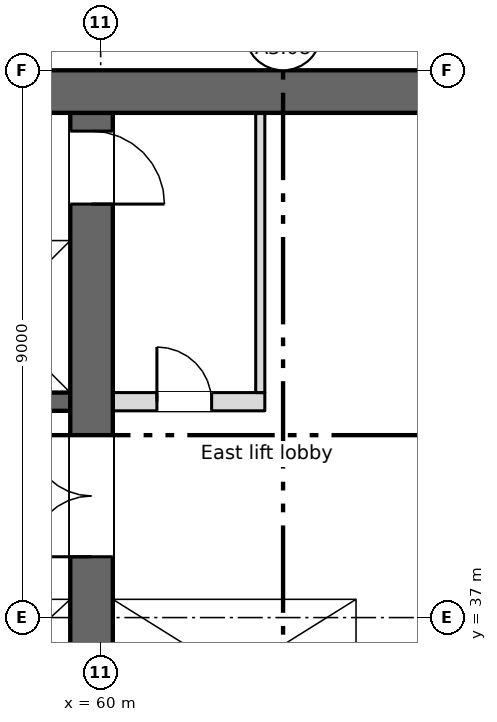
"""IFC4 building model, lengths in metres.
Left out: names, types, materials, properties, quantities, classifications, styles, units other than length and angle.
Written with IfcOpenShell. Run it as: python <this file> out.ifc"""

import sys

from ifc_helpers import new_model, si_unit, direction, frame, frame_2d, origin, place, context, subcontext, project, spatial, rectangle, extrude, element, fill, save


model = new_model("IFC4")
c1 = context("Model", 3, precision=1e-05, world=origin(), true_north=direction((0.0, 1.0)))
c2 = subcontext(c1, "Body", "Model", "MODEL_VIEW")
j1 = project(units=[si_unit("LENGTHUNIT", "METRE"), si_unit("PLANEANGLEUNIT", "RADIAN")], contexts=[c1])
p1 = place(None, origin())
s1 = spatial("IfcSite", under=j1, at=p1, CompositionType="ELEMENT")
p2 = place(p1, origin())
s2 = spatial("IfcBuilding", under=s1, at=p2, CompositionType="ELEMENT")
p3 = place(p2, frame((0.0, 0.0, 215.5)))
s3 = spatial("IfcBuildingStorey", under=s2, at=p3, CompositionType="ELEMENT", Elevation=215.5)
p4 = place(p3, frame((11.55, 45.65, 0.0), z_axis=(0.0, 0.0, 1.0), x_axis=(1.0, 0.0, 0.0)))
e1 = element("IfcWall", 1, at=p4, inside=s3, PredefinedType="SHEAR", context=c2, shape_type="SweptSolid", body=[
    extrude(rectangle(XDim=54.9, YDim=0.7, at=frame_2d((27.45, 0.0))), origin(), (0.0, 0.0, 1.0), 3.35),
])
p5 = place(p4, frame((1.2, 0.0, 0.6)))
e2 = element("IfcOpeningElement", 2, at=p5, cuts=e1, PredefinedType="OPENING", context=c2, shape_type="SweptSolid", body=[
    extrude(rectangle(XDim=0.6, YDim=2.4, at=frame_2d((0.3, 1.2))), frame((0.0, 0.36, 0.0), z_axis=(0.0, -1.0, 0.0), x_axis=(1.0, 0.0, 0.0)), (0.0, 0.0, 1.0), 0.72),
])
p6 = place(p3, frame((64.35, 34.8, 0.0), z_axis=(0.0, 0.0, 1.0), x_axis=(0.0, 1.0, 0.0)))
e3 = element("IfcWall", 3, at=p6, inside=s3, PredefinedType="SHEAR", context=c2, shape_type="SweptSolid", body=[
    extrude(rectangle(XDim=10.5, YDim=0.3, at=frame_2d((5.25, 0.0))), origin(), (0.0, 0.0, 1.0), 3.35),
])
p7 = place(p3, frame((59.85, 28.4, 0.0), z_axis=(0.0, 0.0, 1.0), x_axis=(0.0, 1.0, 0.0)))
e4 = element("IfcWall", 4, at=p7, inside=s3, PredefinedType="SHEAR", context=c2, shape_type="SweptSolid", body=[
    extrude(rectangle(XDim=16.9, YDim=0.7, at=frame_2d((8.45, 0.0))), origin(), (0.0, 0.0, 1.0), 3.35),
])
p8 = place(p7, frame((9.6, 0.0, 0.0)))
e5 = element("IfcOpeningElement", 5, at=p8, cuts=e4, PredefinedType="OPENING", context=c2, shape_type="SweptSolid", body=[
    extrude(rectangle(XDim=2.0, YDim=2.1, at=frame_2d((1.0, 1.05))), frame((0.0, 0.36, 0.0), z_axis=(0.0, -1.0, 0.0), x_axis=(1.0, 0.0, 0.0)), (0.0, 0.0, 1.0), 0.72),
])
p9 = place(p7, frame((15.4, 0.0, 0.0)))
e6 = element("IfcOpeningElement", 6, at=p9, cuts=e4, PredefinedType="OPENING", context=c2, shape_type="SweptSolid", body=[
    extrude(rectangle(XDim=1.2, YDim=2.1, at=frame_2d((0.6, 1.05))), frame((0.0, 0.36, 0.0), z_axis=(0.0, -1.0, 0.0), x_axis=(1.0, 0.0, 0.0)), (0.0, 0.0, 1.0), 0.72),
])
p10 = place(p3, frame((47.3, 37.45, 0.0), z_axis=(0.0, 0.0, 1.0), x_axis=(1.0, 0.0, 0.0)))
e7 = element("IfcWall", 7, at=p10, inside=s3, PredefinedType="SHEAR", context=c2, shape_type="SweptSolid", body=[
    extrude(rectangle(XDim=12.2, YDim=0.3, at=frame_2d((6.1, 0.0))), origin(), (0.0, 0.0, 1.0), 3.35),
])
p11 = place(p10, frame((4.3, 0.0, 0.0)))
e8 = element("IfcOpeningElement", 8, at=p11, cuts=e7, PredefinedType="OPENING", context=c2, shape_type="SweptSolid", body=[
    extrude(rectangle(XDim=1.1, YDim=2.1, at=frame_2d((0.55, 1.05))), frame((0.0, 0.16, 0.0), z_axis=(0.0, -1.0, 0.0), x_axis=(1.0, 0.0, 0.0)), (0.0, 0.0, 1.0), 0.32),
])
p12 = place(p10, frame((7.3, 0.0, 0.0)))
e9 = element("IfcOpeningElement", 9, at=p12, cuts=e7, PredefinedType="OPENING", context=c2, shape_type="SweptSolid", body=[
    extrude(rectangle(XDim=1.1, YDim=2.1, at=frame_2d((0.55, 1.05))), frame((0.0, 0.16, 0.0), z_axis=(0.0, -1.0, 0.0), x_axis=(1.0, 0.0, 0.0)), (0.0, 0.0, 1.0), 0.32),
])
p13 = place(p10, frame((10.3, 0.0, 0.0)))
e10 = element("IfcOpeningElement", 10, at=p13, cuts=e7, PredefinedType="OPENING", context=c2, shape_type="SweptSolid", body=[
    extrude(rectangle(XDim=1.1, YDim=2.1, at=frame_2d((0.55, 1.05))), frame((0.0, 0.16, 0.0), z_axis=(0.0, -1.0, 0.0), x_axis=(1.0, 0.0, 0.0)), (0.0, 0.0, 1.0), 0.32),
])
p14 = place(p3, frame((60.2, 37.45, 0.0), z_axis=(0.0, 0.0, 1.0), x_axis=(1.0, 0.0, 0.0)))
e11 = element("IfcWall", 11, at=p14, inside=s3, PredefinedType="SHEAR", context=c2, shape_type="SweptSolid", body=[
    extrude(rectangle(XDim=4.0, YDim=0.3, at=frame_2d((2.0, 0.0))), origin(), (0.0, 0.0, 1.0), 3.35),
])
p15 = place(p14, frame((1.45, 0.0, 0.0)))
e12 = element("IfcOpeningElement", 12, at=p15, cuts=e11, PredefinedType="OPENING", context=c2, shape_type="SweptSolid", body=[
    extrude(rectangle(XDim=1.1, YDim=2.1, at=frame_2d((0.55, 1.05))), frame((0.0, 0.16, 0.0), z_axis=(0.0, -1.0, 0.0), x_axis=(1.0, 0.0, 0.0)), (0.0, 0.0, 1.0), 0.32),
])
p16 = place(p3, frame((18.5, 40.55, 0.0), z_axis=(0.0, 0.0, 1.0), x_axis=(1.0, 0.0, 0.0)))
e13 = element("IfcWall", 13, at=p16, inside=s3, PredefinedType="SHEAR", context=c2, shape_type="SweptSolid", body=[
    extrude(rectangle(XDim=41.0, YDim=0.3, at=frame_2d((20.5, 0.0))), origin(), (0.0, 0.0, 1.0), 3.35),
])
p17 = place(p16, frame((2.15, 0.0, 0.0)))
e14 = element("IfcOpeningElement", 14, at=p17, cuts=e13, PredefinedType="OPENING", context=c2, shape_type="SweptSolid", body=[
    extrude(rectangle(XDim=0.9, YDim=2.1, at=frame_2d((0.45, 1.05))), frame((0.0, 0.16, 0.0), z_axis=(0.0, -1.0, 0.0), x_axis=(1.0, 0.0, 0.0)), (0.0, 0.0, 1.0), 0.32),
])
p18 = place(p16, frame((15.9, 0.0, 0.0)))
e15 = element("IfcOpeningElement", 15, at=p18, cuts=e13, PredefinedType="OPENING", context=c2, shape_type="SweptSolid", body=[
    extrude(rectangle(XDim=0.9, YDim=2.1, at=frame_2d((0.45, 1.05))), frame((0.0, 0.16, 0.0), z_axis=(0.0, -1.0, 0.0), x_axis=(1.0, 0.0, 0.0)), (0.0, 0.0, 1.0), 0.32),
])
p19 = place(p16, frame((21.4, 0.0, 0.0)))
e16 = element("IfcOpeningElement", 16, at=p19, cuts=e13, PredefinedType="OPENING", context=c2, shape_type="SweptSolid", body=[
    extrude(rectangle(XDim=0.9, YDim=2.1, at=frame_2d((0.45, 1.05))), frame((0.0, 0.16, 0.0), z_axis=(0.0, -1.0, 0.0), x_axis=(1.0, 0.0, 0.0)), (0.0, 0.0, 1.0), 0.32),
])
p20 = place(p16, frame((26.9, 0.0, 0.0)))
e17 = element("IfcOpeningElement", 17, at=p20, cuts=e13, PredefinedType="OPENING", context=c2, shape_type="SweptSolid", body=[
    extrude(rectangle(XDim=0.9, YDim=2.1, at=frame_2d((0.45, 1.05))), frame((0.0, 0.16, 0.0), z_axis=(0.0, -1.0, 0.0), x_axis=(1.0, 0.0, 0.0)), (0.0, 0.0, 1.0), 0.32),
])
p21 = place(p16, frame((6.175, 0.0, 0.0)))
e18 = element("IfcOpeningElement", 18, at=p21, cuts=e13, PredefinedType="OPENING", context=c2, shape_type="SweptSolid", body=[
    extrude(rectangle(XDim=1.1, YDim=2.1, at=frame_2d((0.55, 1.05))), frame((0.0, 0.16, 0.0), z_axis=(0.0, -1.0, 0.0), x_axis=(1.0, 0.0, 0.0)), (0.0, 0.0, 1.0), 0.32),
])
p22 = place(p16, frame((8.925, 0.0, 0.0)))
e19 = element("IfcOpeningElement", 19, at=p22, cuts=e13, PredefinedType="OPENING", context=c2, shape_type="SweptSolid", body=[
    extrude(rectangle(XDim=1.1, YDim=2.1, at=frame_2d((0.55, 1.05))), frame((0.0, 0.16, 0.0), z_axis=(0.0, -1.0, 0.0), x_axis=(1.0, 0.0, 0.0)), (0.0, 0.0, 1.0), 0.32),
])
p23 = place(p16, frame((11.675, 0.0, 0.0)))
e20 = element("IfcOpeningElement", 20, at=p23, cuts=e13, PredefinedType="OPENING", context=c2, shape_type="SweptSolid", body=[
    extrude(rectangle(XDim=1.1, YDim=2.1, at=frame_2d((0.55, 1.05))), frame((0.0, 0.16, 0.0), z_axis=(0.0, -1.0, 0.0), x_axis=(1.0, 0.0, 0.0)), (0.0, 0.0, 1.0), 0.32),
])
p24 = place(p16, frame((30.925, 0.0, 0.0)))
e21 = element("IfcOpeningElement", 21, at=p24, cuts=e13, PredefinedType="OPENING", context=c2, shape_type="SweptSolid", body=[
    extrude(rectangle(XDim=1.1, YDim=2.1, at=frame_2d((0.55, 1.05))), frame((0.0, 0.16, 0.0), z_axis=(0.0, -1.0, 0.0), x_axis=(1.0, 0.0, 0.0)), (0.0, 0.0, 1.0), 0.32),
])
p25 = place(p16, frame((33.675, 0.0, 0.0)))
e22 = element("IfcOpeningElement", 22, at=p25, cuts=e13, PredefinedType="OPENING", context=c2, shape_type="SweptSolid", body=[
    extrude(rectangle(XDim=1.1, YDim=2.1, at=frame_2d((0.55, 1.05))), frame((0.0, 0.16, 0.0), z_axis=(0.0, -1.0, 0.0), x_axis=(1.0, 0.0, 0.0)), (0.0, 0.0, 1.0), 0.32),
])
p26 = place(p16, frame((36.375, 0.0, 0.0)))
e23 = element("IfcOpeningElement", 23, at=p26, cuts=e13, PredefinedType="OPENING", context=c2, shape_type="SweptSolid", body=[
    extrude(rectangle(XDim=1.2, YDim=2.1, at=frame_2d((0.6, 1.05))), frame((0.0, 0.16, 0.0), z_axis=(0.0, -1.0, 0.0), x_axis=(1.0, 0.0, 0.0)), (0.0, 0.0, 1.0), 0.32),
])
p27 = place(p16, frame((39.15, 0.0, 0.0)))
e24 = element("IfcOpeningElement", 24, at=p27, cuts=e13, PredefinedType="OPENING", context=c2, shape_type="SweptSolid", body=[
    extrude(rectangle(XDim=1.2, YDim=2.1, at=frame_2d((0.6, 1.05))), frame((0.0, 0.16, 0.0), z_axis=(0.0, -1.0, 0.0), x_axis=(1.0, 0.0, 0.0)), (0.0, 0.0, 1.0), 0.32),
])
p28 = place(p3, frame((18.5, 43.35, 0.0), z_axis=(0.0, 0.0, 1.0), x_axis=(1.0, 0.0, 0.0)))
e25 = element("IfcWall", 25, at=p28, inside=s3, PredefinedType="SHEAR", context=c2, shape_type="SweptSolid", body=[
    extrude(rectangle(XDim=41.0, YDim=0.3, at=frame_2d((20.5, 0.0))), origin(), (0.0, 0.0, 1.0), 3.35),
])
p29 = place(p3, frame((60.2, 40.55, 0.0), z_axis=(0.0, 0.0, 1.0), x_axis=(1.0, 0.0, 0.0)))
e26 = element("IfcWall", 26, at=p29, inside=s3, PredefinedType="PARTITIONING", context=c2, shape_type="SweptSolid", body=[
    extrude(rectangle(XDim=2.5, YDim=0.3, at=frame_2d((1.25, 0.0))), origin(), (0.0, 0.0, 1.0), 3.35),
])
p30 = place(p29, frame((0.725, 0.0, 0.0)))
e27 = element("IfcOpeningElement", 27, at=p30, cuts=e26, PredefinedType="OPENING", context=c2, shape_type="SweptSolid", body=[
    extrude(rectangle(XDim=0.9, YDim=2.1, at=frame_2d((0.45, 1.05))), frame((0.0, 0.16, 0.0), z_axis=(0.0, -1.0, 0.0), x_axis=(1.0, 0.0, 0.0)), (0.0, 0.0, 1.0), 0.32),
])
p31 = place(p3, frame((62.625, 40.7, 0.0), z_axis=(0.0, 0.0, 1.0), x_axis=(0.0, 1.0, 0.0)))
e28 = element("IfcWall", 28, at=p31, inside=s3, PredefinedType="PARTITIONING", context=c2, shape_type="SweptSolid", body=[
    extrude(rectangle(XDim=4.6, YDim=0.15, at=frame_2d((2.3, 0.0))), origin(), (0.0, 0.0, 1.0), 3.35),
])
p32 = place(p30, origin())
e29 = element("IfcDoor", 29, at=p32, inside=s3, OperationType="SINGLE_SWING_LEFT", PredefinedType="DOOR", context=c2, shape_type="SweptSolid", body=[
    extrude(rectangle(XDim=0.9, YDim=2.1, at=frame_2d((0.45, 1.05))), frame((0.0, 0.025, 0.0), z_axis=(0.0, -1.0, 0.0), x_axis=(1.0, 0.0, 0.0)), (0.0, 0.0, 1.0), 0.05),
])
fill(e27, e29)
p33 = place(p15, origin())
e30 = element("IfcDoor", 30, at=p33, inside=s3, OperationType="SLIDING_TO_LEFT", PredefinedType="DOOR", context=c2, shape_type="SweptSolid", body=[
    extrude(rectangle(XDim=1.1, YDim=2.1, at=frame_2d((0.55, 1.05))), frame((0.0, 0.025, 0.0), z_axis=(0.0, -1.0, 0.0), x_axis=(1.0, 0.0, 0.0)), (0.0, 0.0, 1.0), 0.05),
])
fill(e12, e30)
p34 = place(p8, origin())
e31 = element("IfcDoor", 31, at=p34, inside=s3, OperationType="DOUBLE_DOOR_SINGLE_SWING", PredefinedType="DOOR", context=c2, shape_type="SweptSolid", body=[
    extrude(rectangle(XDim=2.0, YDim=2.1, at=frame_2d((1.0, 1.05))), frame((0.0, 0.025, 0.0), z_axis=(0.0, -1.0, 0.0), x_axis=(1.0, 0.0, 0.0)), (0.0, 0.0, 1.0), 0.05),
])
fill(e5, e31)
p35 = place(p9, origin())
e32 = element("IfcDoor", 32, at=p35, inside=s3, OperationType="SINGLE_SWING_LEFT", PredefinedType="DOOR", context=c2, shape_type="SweptSolid", body=[
    extrude(rectangle(XDim=1.2, YDim=2.1, at=frame_2d((0.6, 1.05))), frame((0.0, 0.025, 0.0), z_axis=(0.0, -1.0, 0.0), x_axis=(1.0, 0.0, 0.0)), (0.0, 0.0, 1.0), 0.05),
])
fill(e6, e32)
save(model, sys.argv[1])
